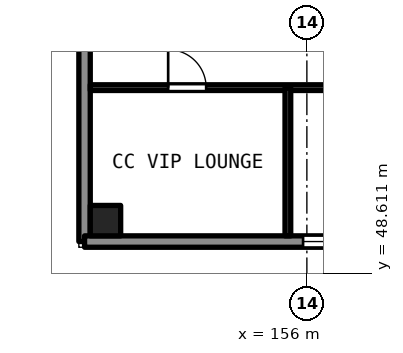
"""IFC4 building model, lengths in metres.
Left out: names, types, materials, properties, quantities, classifications, styles, units other than length and angle.
Written with IfcOpenShell. Run it as: python <this file> out.ifc"""

import sys

from ifc_helpers import new_model, si_unit, direction, frame, frame_2d, origin, origin_2d, place, context, subcontext, project, spatial, rectangle, extrude, element, fill, save


model = new_model("IFC4")
c1 = context("Model", 3, precision=1e-05, world=origin(), true_north=direction((0.0, 1.0)))
c2 = subcontext(c1, "Body", "Model", "MODEL_VIEW")
j1 = project(units=[si_unit("LENGTHUNIT", "METRE"), si_unit("PLANEANGLEUNIT", "RADIAN")], contexts=[c1])
p1 = place(None, origin())
s1 = spatial("IfcSite", under=j1, at=p1, CompositionType="ELEMENT")
p2 = place(p1, origin())
s2 = spatial("IfcBuilding", under=s1, at=p2, CompositionType="ELEMENT")
p3 = place(p2, origin())
s3 = spatial("IfcBuildingStorey", under=s2, at=p3, CompositionType="ELEMENT", Elevation=0.0)
p4 = place(p3, frame((150.7, 50.0, -1.2), z_axis=(0.0, 0.0, 1.0), x_axis=(1.0, 0.0, 0.0)))
e1 = element("IfcColumn", 1, at=p4, inside=s3, PredefinedType="COLUMN", context=c2, shape_type="SweptSolid", body=[
    extrude(rectangle(XDim=0.8, YDim=0.8, at=origin_2d()), origin(), (0.0, 0.0, 1.0), 10.2),
])
p5 = place(p3, frame((150.15, 49.45, 0.0), z_axis=(0.0, 0.0, 1.0), x_axis=(0.0, 1.0, 0.0)))
e2 = element("IfcWall", 2, at=p5, inside=s3, PredefinedType="SOLIDWALL", context=c2, shape_type="SweptSolid", body=[
    extrude(rectangle(XDim=50.55, YDim=0.3, at=frame_2d((25.275, 0.0))), origin(), (0.0, 0.0, 1.0), 8.59),
])
p6 = place(p5, frame((32.4, 0.0, 0.0)))
e3 = element("IfcOpeningElement", 3, at=p6, cuts=e2, PredefinedType="OPENING", context=c2, shape_type="SweptSolid", body=[
    extrude(rectangle(XDim=2.4, YDim=2.4, at=frame_2d((1.2, 1.2))), frame((0.0, 0.161, 0.0), z_axis=(0.0, -1.0, 0.0), x_axis=(1.0, 0.0, 0.0)), (0.0, 0.0, 1.0), 0.321),
])
p7 = place(p5, frame((36.4, 0.0, 0.0)))
e4 = element("IfcOpeningElement", 4, at=p7, cuts=e2, PredefinedType="OPENING", context=c2, shape_type="SweptSolid", body=[
    extrude(rectangle(XDim=2.4, YDim=2.4, at=frame_2d((1.2, 1.2))), frame((0.0, 0.161, 0.0), z_axis=(0.0, -1.0, 0.0), x_axis=(1.0, 0.0, 0.0)), (0.0, 0.0, 1.0), 0.321),
])
p8 = place(p5, frame((12.15, 0.0, 0.0)))
e5 = element("IfcOpeningElement", 5, at=p8, cuts=e2, PredefinedType="OPENING", context=c2, shape_type="SweptSolid", body=[
    extrude(rectangle(XDim=2.4, YDim=2.4, at=frame_2d((1.2, 1.2))), frame((0.0, 0.161, 0.0), z_axis=(0.0, -1.0, 0.0), x_axis=(1.0, 0.0, 0.0)), (0.0, 0.0, 1.0), 0.321),
])
p9 = place(p5, frame((16.15, 0.0, 0.0)))
e6 = element("IfcOpeningElement", 6, at=p9, cuts=e2, PredefinedType="OPENING", context=c2, shape_type="SweptSolid", body=[
    extrude(rectangle(XDim=2.4, YDim=2.4, at=frame_2d((1.2, 1.2))), frame((0.0, 0.161, 0.0), z_axis=(0.0, -1.0, 0.0), x_axis=(1.0, 0.0, 0.0)), (0.0, 0.0, 1.0), 0.321),
])
p10 = place(p5, frame((22.15, 0.0, 0.0)))
e7 = element("IfcOpeningElement", 7, at=p10, cuts=e2, PredefinedType="OPENING", context=c2, shape_type="SweptSolid", body=[
    extrude(rectangle(XDim=2.4, YDim=2.4, at=frame_2d((1.2, 1.2))), frame((0.0, 0.161, 0.0), z_axis=(0.0, -1.0, 0.0), x_axis=(1.0, 0.0, 0.0)), (0.0, 0.0, 1.0), 0.321),
])
p11 = place(p5, frame((26.15, 0.0, 0.0)))
e8 = element("IfcOpeningElement", 8, at=p11, cuts=e2, PredefinedType="OPENING", context=c2, shape_type="SweptSolid", body=[
    extrude(rectangle(XDim=2.4, YDim=2.4, at=frame_2d((1.2, 1.2))), frame((0.0, 0.161, 0.0), z_axis=(0.0, -1.0, 0.0), x_axis=(1.0, 0.0, 0.0)), (0.0, 0.0, 1.0), 0.321),
])
p12 = place(p5, frame((42.15, 0.0, 0.0)))
e9 = element("IfcOpeningElement", 9, at=p12, cuts=e2, PredefinedType="OPENING", context=c2, shape_type="SweptSolid", body=[
    extrude(rectangle(XDim=2.4, YDim=2.4, at=frame_2d((1.2, 1.2))), frame((0.0, 0.161, 0.0), z_axis=(0.0, -1.0, 0.0), x_axis=(1.0, 0.0, 0.0)), (0.0, 0.0, 1.0), 0.321),
])
p13 = place(p5, frame((46.15, 0.0, 0.0)))
e10 = element("IfcOpeningElement", 10, at=p13, cuts=e2, PredefinedType="OPENING", context=c2, shape_type="SweptSolid", body=[
    extrude(rectangle(XDim=2.4, YDim=2.4, at=frame_2d((1.2, 1.2))), frame((0.0, 0.161, 0.0), z_axis=(0.0, -1.0, 0.0), x_axis=(1.0, 0.0, 0.0)), (0.0, 0.0, 1.0), 0.321),
])
p14 = place(p3, frame((150.15, 49.45, 0.0), z_axis=(0.0, 0.0, 1.0), x_axis=(1.0, 0.0, 0.0)))
e11 = element("IfcWall", 11, at=p14, inside=s3, PredefinedType="SOLIDWALL", context=c2, shape_type="SweptSolid", body=[
    extrude(rectangle(XDim=10.875, YDim=0.3, at=frame_2d((5.438, 0.0))), origin(), (0.0, 0.0, 1.0), 8.59),
])
p15 = place(p14, frame((5.75, 0.0, 0.9)))
e12 = element("IfcOpeningElement", 12, at=p15, cuts=e11, PredefinedType="OPENING", context=c2, shape_type="SweptSolid", body=[
    extrude(rectangle(XDim=2.4, YDim=1.8, at=frame_2d((1.2, 0.9))), frame((0.0, 0.161, 0.0), z_axis=(0.0, -1.0, 0.0), x_axis=(1.0, 0.0, 0.0)), (0.0, 0.0, 1.0), 0.321),
])
p16 = place(p3, frame((150.3, 53.5, 0.0), z_axis=(0.0, 0.0, 1.0), x_axis=(1.0, 0.0, 0.0)))
e13 = element("IfcWall", 13, at=p16, inside=s3, PredefinedType="PARTITIONING", context=c2, shape_type="SweptSolid", body=[
    extrude(rectangle(XDim=10.725, YDim=0.15, at=frame_2d((5.362, 0.0))), origin(), (0.0, 0.0, 1.0), 8.59),
])
p17 = place(p16, frame((7.4, 0.0, 0.0)))
e14 = element("IfcOpeningElement", 14, at=p17, cuts=e13, PredefinedType="OPENING", context=c2, shape_type="SweptSolid", body=[
    extrude(rectangle(XDim=1.0, YDim=2.1, at=frame_2d((0.5, 1.05))), frame((0.0, 0.085, 0.0), z_axis=(0.0, -1.0, 0.0), x_axis=(1.0, 0.0, 0.0)), (0.0, 0.0, 1.0), 0.171),
])
p18 = place(p16, frame((2.05, 0.0, 0.0)))
e15 = element("IfcOpeningElement", 15, at=p18, cuts=e13, PredefinedType="OPENING", context=c2, shape_type="SweptSolid", body=[
    extrude(rectangle(XDim=1.0, YDim=2.1, at=frame_2d((0.5, 1.05))), frame((0.0, 0.085, 0.0), z_axis=(0.0, -1.0, 0.0), x_axis=(1.0, 0.0, 0.0)), (0.0, 0.0, 1.0), 0.171),
])
p19 = place(p3, frame((155.5, 49.6, 0.0), z_axis=(0.0, 0.0, 1.0), x_axis=(0.0, 1.0, 0.0)))
e16 = element("IfcWall", 16, at=p19, inside=s3, PredefinedType="PARTITIONING", context=c2, shape_type="SweptSolid", body=[
    extrude(rectangle(XDim=3.9, YDim=0.15, at=frame_2d((1.95, 0.0))), origin(), (0.0, 0.0, 1.0), 8.59),
])
p20 = place(p18, origin())
e17 = element("IfcDoor", 17, at=p20, inside=s3, OperationType="SINGLE_SWING_LEFT", PredefinedType="DOOR", context=c2, shape_type="SweptSolid", body=[
    extrude(rectangle(XDim=1.0, YDim=2.1, at=frame_2d((0.5, 1.05))), frame((0.0, 0.025, 0.0), z_axis=(0.0, -1.0, 0.0), x_axis=(1.0, 0.0, 0.0)), (0.0, 0.0, 1.0), 0.05),
])
fill(e15, e17)
p21 = place(p15, origin())
e18 = element("IfcWindow", 18, at=p21, inside=s3, PartitioningType="DOUBLE_PANEL_VERTICAL", PredefinedType="WINDOW", context=c2, shape_type="SweptSolid", body=[
    extrude(rectangle(XDim=2.4, YDim=1.8, at=frame_2d((1.2, 0.9))), frame((0.0, 0.03, 0.0), z_axis=(0.0, -1.0, 0.0), x_axis=(1.0, 0.0, 0.0)), (0.0, 0.0, 1.0), 0.06),
])
fill(e12, e18)
save(model, sys.argv[1])
